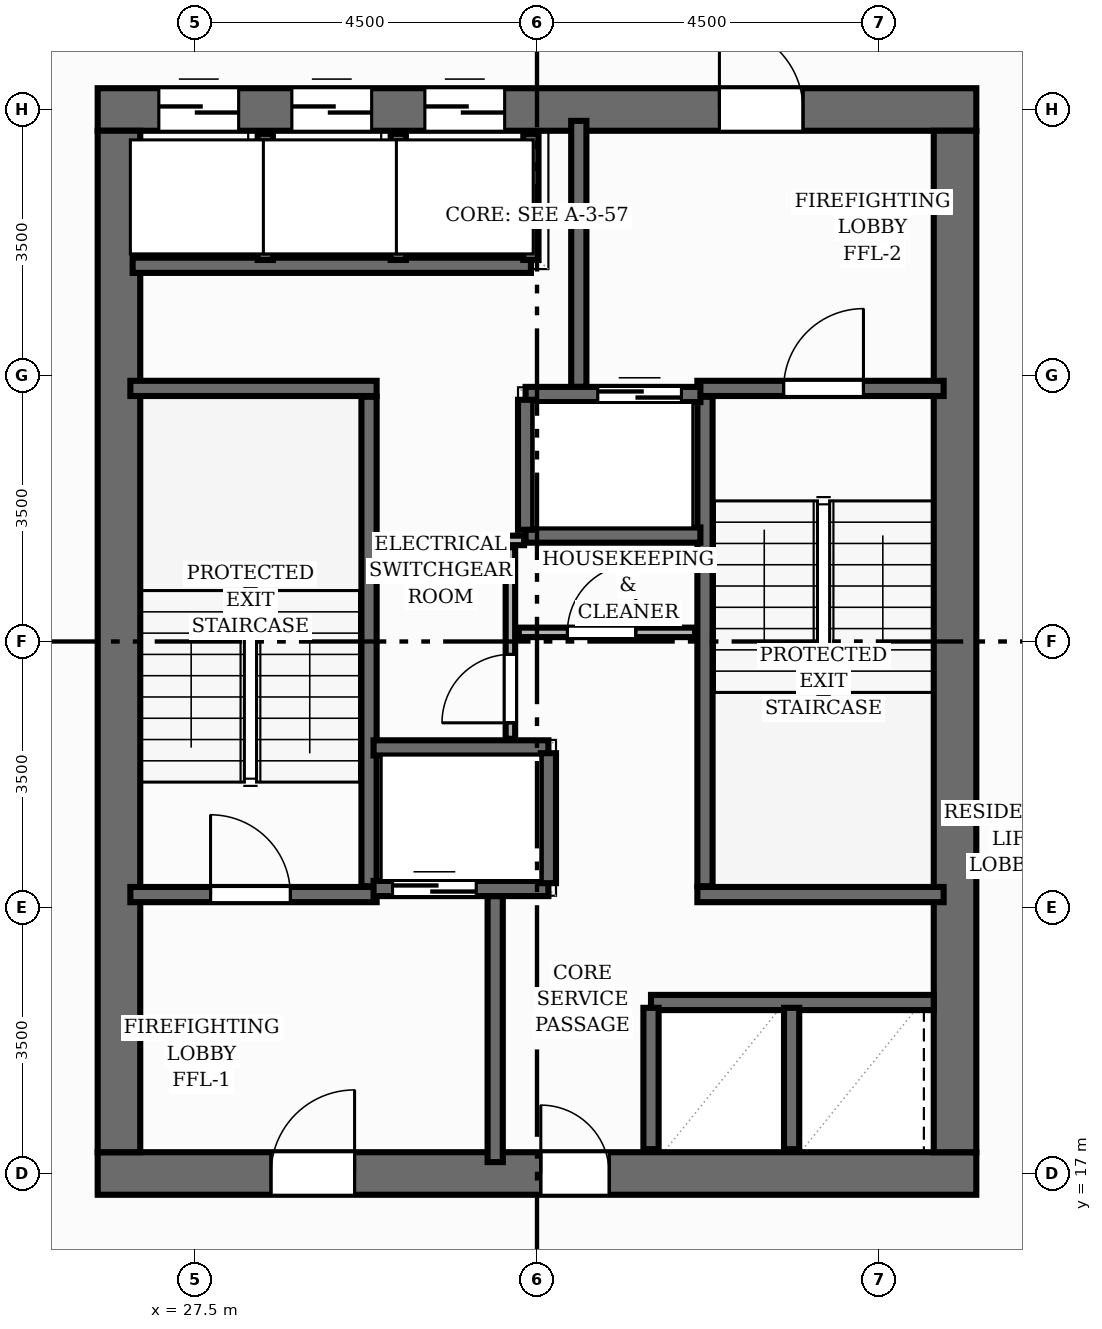
"""IFC4 building model, lengths in metres.
Left out: names, types, materials, properties, quantities, classifications, styles, units other than length and angle.
Written with IfcOpenShell. Run it as: python <this file> out.ifc"""

import sys

from ifc_helpers import new_model, si_unit, direction, frame, frame_2d, origin, place, context, subcontext, project, spatial, rectangle, extrude, element, fill, save


model = new_model("IFC4")
c1 = context("Model", 3, precision=1e-05, world=origin(), true_north=direction((0.0, 1.0)))
c2 = subcontext(c1, "Body", "Model", "MODEL_VIEW")
j1 = project(units=[si_unit("LENGTHUNIT", "METRE"), si_unit("PLANEANGLEUNIT", "RADIAN")], contexts=[c1])
p1 = place(None, origin())
s1 = spatial("IfcSite", under=j1, at=p1, CompositionType="ELEMENT")
p2 = place(p1, origin())
s2 = spatial("IfcBuilding", under=s1, at=p2, CompositionType="ELEMENT")
p3 = place(p2, frame((0.0, 0.0, 236.64)))
s3 = spatial("IfcBuildingStorey", under=s2, at=p3, CompositionType="ELEMENT", Elevation=236.64)
p4 = place(p3, frame((26.22, 17.0, 0.0), z_axis=(0.0, 0.0, 1.0), x_axis=(1.0, 0.0, 0.0)))
e1 = element("IfcWall", 1, at=p4, inside=s3, PredefinedType="SHEAR", context=c2, shape_type="SweptSolid", body=[
    extrude(rectangle(XDim=11.56, YDim=0.56, at=frame_2d((5.78, 0.0))), origin(), (0.0, 0.0, 1.0), 3.2),
])
p5 = place(p4, frame((2.28, 0.0, 0.0)))
e2 = element("IfcOpeningElement", 2, at=p5, cuts=e1, PredefinedType="OPENING", context=c2, shape_type="SweptSolid", body=[
    extrude(rectangle(XDim=1.1, YDim=2.15, at=frame_2d((0.55, 1.075))), frame((0.0, 0.29, 0.0), z_axis=(0.0, -1.0, 0.0), x_axis=(1.0, 0.0, 0.0)), (0.0, 0.0, 1.0), 0.58),
])
p6 = place(p4, frame((5.83, 0.0, 0.0)))
e3 = element("IfcOpeningElement", 3, at=p6, cuts=e1, PredefinedType="OPENING", context=c2, shape_type="SweptSolid", body=[
    extrude(rectangle(XDim=0.9, YDim=2.1, at=frame_2d((0.45, 1.05))), frame((0.0, 0.29, 0.0), z_axis=(0.0, -1.0, 0.0), x_axis=(1.0, 0.0, 0.0)), (0.0, 0.0, 1.0), 0.58),
])
p7 = place(p3, frame((26.22, 31.0, 0.0), z_axis=(0.0, 0.0, 1.0), x_axis=(1.0, 0.0, 0.0)))
e4 = element("IfcWall", 4, at=p7, inside=s3, PredefinedType="SHEAR", context=c2, shape_type="SweptSolid", body=[
    extrude(rectangle(XDim=11.56, YDim=0.56, at=frame_2d((5.78, 0.0))), origin(), (0.0, 0.0, 1.0), 3.2),
])
p8 = place(p7, frame((8.18, 0.0, 0.0)))
e5 = element("IfcOpeningElement", 5, at=p8, cuts=e4, PredefinedType="OPENING", context=c2, shape_type="SweptSolid", body=[
    extrude(rectangle(XDim=1.1, YDim=2.15, at=frame_2d((0.55, 1.075))), frame((0.0, 0.29, 0.0), z_axis=(0.0, -1.0, 0.0), x_axis=(1.0, 0.0, 0.0)), (0.0, 0.0, 1.0), 0.58),
])
p9 = place(p7, frame((0.805, 0.0, 0.0)))
e6 = element("IfcOpeningElement", 6, at=p9, cuts=e4, PredefinedType="OPENING", context=c2, shape_type="SweptSolid", body=[
    extrude(rectangle(XDim=1.05, YDim=2.15, at=frame_2d((0.525, 1.075))), frame((0.0, 0.29, 0.0), z_axis=(0.0, -1.0, 0.0), x_axis=(1.0, 0.0, 0.0)), (0.0, 0.0, 1.0), 0.58),
])
p10 = place(p7, frame((2.555, 0.0, 0.0)))
e7 = element("IfcOpeningElement", 7, at=p10, cuts=e4, PredefinedType="OPENING", context=c2, shape_type="SweptSolid", body=[
    extrude(rectangle(XDim=1.05, YDim=2.15, at=frame_2d((0.525, 1.075))), frame((0.0, 0.29, 0.0), z_axis=(0.0, -1.0, 0.0), x_axis=(1.0, 0.0, 0.0)), (0.0, 0.0, 1.0), 0.58),
])
p11 = place(p7, frame((4.305, 0.0, 0.0)))
e8 = element("IfcOpeningElement", 8, at=p11, cuts=e4, PredefinedType="OPENING", context=c2, shape_type="SweptSolid", body=[
    extrude(rectangle(XDim=1.05, YDim=2.15, at=frame_2d((0.525, 1.075))), frame((0.0, 0.29, 0.0), z_axis=(0.0, -1.0, 0.0), x_axis=(1.0, 0.0, 0.0)), (0.0, 0.0, 1.0), 0.58),
])
for number, where, z_axis, x_axis in (
    (9, (26.5, 17.28, 0.0), (0.0, 0.0, 1.0), (0.0, 1.0, 0.0)),
    (10, (37.5, 17.28, 0.0), (0.0, 0.0, 1.0), (0.0, 1.0, 0.0)),
):
    element("IfcWall", number, at=place(p3, frame(where, z_axis=z_axis, x_axis=x_axis)), inside=s3, PredefinedType="SHEAR", context=c2, shape_type="SweptSolid", body=[
        extrude(rectangle(XDim=13.44, YDim=0.56, at=frame_2d((6.72, 0.0))), origin(), (0.0, 0.0, 1.0), 3.2),
    ])
p12 = place(p3, frame((29.79, 20.78, 0.0), z_axis=(0.0, 0.0, 1.0), x_axis=(0.0, 1.0, 0.0)))
e11 = element("IfcWall", 11, at=p12, inside=s3, PredefinedType="SHEAR", context=c2, shape_type="SweptSolid", body=[
    extrude(rectangle(XDim=6.44, YDim=0.2, at=frame_2d((3.22, 0.0))), origin(), (0.0, 0.0, 1.0), 3.2),
])
p13 = place(p3, frame((26.65, 27.33, 0.0), z_axis=(0.0, 0.0, 1.0), x_axis=(1.0, 0.0, 0.0)))
e12 = element("IfcWall", 12, at=p13, inside=s3, PredefinedType="SHEAR", context=c2, shape_type="SweptSolid", body=[
    extrude(rectangle(XDim=3.24, YDim=0.2, at=frame_2d((1.62, 0.0))), origin(), (0.0, 0.0, 1.0), 3.2),
])
p14 = place(p3, frame((26.65, 20.67, 0.0), z_axis=(0.0, 0.0, 1.0), x_axis=(1.0, 0.0, 0.0)))
e13 = element("IfcWall", 13, at=p14, inside=s3, PredefinedType="SHEAR", context=c2, shape_type="SweptSolid", body=[
    extrude(rectangle(XDim=3.24, YDim=0.2, at=frame_2d((1.62, 0.0))), origin(), (0.0, 0.0, 1.0), 3.2),
])
p15 = place(p14, frame((1.055, 0.0, 0.0)))
e14 = element("IfcOpeningElement", 14, at=p15, cuts=e13, PredefinedType="OPENING", context=c2, shape_type="SweptSolid", body=[
    extrude(rectangle(XDim=1.05, YDim=2.15, at=frame_2d((0.525, 1.075))), frame((0.0, 0.11, 0.0), z_axis=(0.0, -1.0, 0.0), x_axis=(1.0, 0.0, 0.0)), (0.0, 0.0, 1.0), 0.22),
])
p16 = place(p3, frame((34.21, 20.78, 0.0), z_axis=(0.0, 0.0, 1.0), x_axis=(0.0, 1.0, 0.0)))
e15 = element("IfcWall", 15, at=p16, inside=s3, PredefinedType="SHEAR", context=c2, shape_type="SweptSolid", body=[
    extrude(rectangle(XDim=6.44, YDim=0.2, at=frame_2d((3.22, 0.0))), origin(), (0.0, 0.0, 1.0), 3.2),
])
p17 = place(p3, frame((34.11, 20.67, 0.0), z_axis=(0.0, 0.0, 1.0), x_axis=(1.0, 0.0, 0.0)))
e16 = element("IfcWall", 16, at=p17, inside=s3, PredefinedType="SHEAR", context=c2, shape_type="SweptSolid", body=[
    extrude(rectangle(XDim=3.24, YDim=0.2, at=frame_2d((1.62, 0.0))), origin(), (0.0, 0.0, 1.0), 3.2),
])
p18 = place(p3, frame((34.11, 27.33, 0.0), z_axis=(0.0, 0.0, 1.0), x_axis=(1.0, 0.0, 0.0)))
e17 = element("IfcWall", 17, at=p18, inside=s3, PredefinedType="SHEAR", context=c2, shape_type="SweptSolid", body=[
    extrude(rectangle(XDim=3.24, YDim=0.2, at=frame_2d((1.62, 0.0))), origin(), (0.0, 0.0, 1.0), 3.2),
])
p19 = place(p18, frame((1.135, 0.0, 0.0)))
e18 = element("IfcOpeningElement", 18, at=p19, cuts=e17, PredefinedType="OPENING", context=c2, shape_type="SweptSolid", body=[
    extrude(rectangle(XDim=1.05, YDim=2.15, at=frame_2d((0.525, 1.075))), frame((0.0, 0.11, 0.0), z_axis=(0.0, -1.0, 0.0), x_axis=(1.0, 0.0, 0.0)), (0.0, 0.0, 1.0), 0.22),
])
for number, where, z_axis, x_axis in (
    (19, (31.45, 17.15, 0.0), (0.0, 0.0, 1.0), (0.0, 1.0, 0.0)),
    (20, (32.55, 27.35, 0.0), (0.0, 0.0, 1.0), (0.0, 1.0, 0.0)),
):
    element("IfcWall", number, at=place(p3, frame(where, z_axis=z_axis, x_axis=x_axis)), inside=s3, PredefinedType="SHEAR", context=c2, shape_type="SweptSolid", body=[
        extrude(rectangle(XDim=3.5, YDim=0.2, at=frame_2d((1.75, 0.0))), origin(), (0.0, 0.0, 1.0), 3.2),
    ])
p20 = place(p3, frame((29.85, 20.75, 0.0), z_axis=(0.0, 0.0, 1.0), x_axis=(1.0, 0.0, 0.0)))
e21 = element("IfcWall", 21, at=p20, inside=s3, PredefinedType="SHEAR", context=c2, shape_type="SweptSolid", body=[
    extrude(rectangle(XDim=2.3, YDim=0.2, at=frame_2d((1.15, 0.0))), origin(), (0.0, 0.0, 1.0), 3.2),
])
p21 = place(p20, frame((0.25, 0.0, 0.0)))
e22 = element("IfcOpeningElement", 22, at=p21, cuts=e21, PredefinedType="OPENING", context=c2, shape_type="SweptSolid", body=[
    extrude(rectangle(XDim=1.1, YDim=2.15, at=frame_2d((0.55, 1.075))), frame((0.0, 0.11, 0.0), z_axis=(0.0, -1.0, 0.0), x_axis=(1.0, 0.0, 0.0)), (0.0, 0.0, 1.0), 0.22),
])
p22 = place(p3, frame((29.85, 22.6, 0.0), z_axis=(0.0, 0.0, 1.0), x_axis=(1.0, 0.0, 0.0)))
e23 = element("IfcWall", 23, at=p22, inside=s3, PredefinedType="SHEAR", context=c2, shape_type="SweptSolid", body=[
    extrude(rectangle(XDim=2.3, YDim=0.2, at=frame_2d((1.15, 0.0))), origin(), (0.0, 0.0, 1.0), 3.2),
])
p23 = place(p3, frame((32.15, 20.82, 0.0), z_axis=(0.0, 0.0, 1.0), x_axis=(0.0, 1.0, 0.0)))
e24 = element("IfcWall", 24, at=p23, inside=s3, PredefinedType="SHEAR", context=c2, shape_type="SweptSolid", body=[
    extrude(rectangle(XDim=1.71, YDim=0.2, at=frame_2d((0.855, 0.0))), origin(), (0.0, 0.0, 1.0), 3.2),
])
p24 = place(p3, frame((31.85, 27.25, 0.0), z_axis=(0.0, 0.0, 1.0), x_axis=(1.0, 0.0, 0.0)))
e25 = element("IfcWall", 25, at=p24, inside=s3, PredefinedType="SHEAR", context=c2, shape_type="SweptSolid", body=[
    extrude(rectangle(XDim=2.3, YDim=0.2, at=frame_2d((1.15, 0.0))), origin(), (0.0, 0.0, 1.0), 3.2),
])
p25 = place(p24, frame((0.95, 0.0, 0.0)))
e26 = element("IfcOpeningElement", 26, at=p25, cuts=e25, PredefinedType="OPENING", context=c2, shape_type="SweptSolid", body=[
    extrude(rectangle(XDim=1.1, YDim=2.15, at=frame_2d((0.55, 1.075))), frame((0.0, 0.11, 0.0), z_axis=(0.0, -1.0, 0.0), x_axis=(1.0, 0.0, 0.0)), (0.0, 0.0, 1.0), 0.22),
])
p26 = place(p3, frame((31.85, 25.4, 0.0), z_axis=(0.0, 0.0, 1.0), x_axis=(1.0, 0.0, 0.0)))
e27 = element("IfcWall", 27, at=p26, inside=s3, PredefinedType="SHEAR", context=c2, shape_type="SweptSolid", body=[
    extrude(rectangle(XDim=2.3, YDim=0.2, at=frame_2d((1.15, 0.0))), origin(), (0.0, 0.0, 1.0), 3.2),
])
p27 = place(p3, frame((31.85, 25.47, 0.0), z_axis=(0.0, 0.0, 1.0), x_axis=(0.0, 1.0, 0.0)))
e28 = element("IfcWall", 28, at=p27, inside=s3, PredefinedType="SHEAR", context=c2, shape_type="SweptSolid", body=[
    extrude(rectangle(XDim=1.71, YDim=0.2, at=frame_2d((0.855, 0.0))), origin(), (0.0, 0.0, 1.0), 3.2),
])
p28 = place(p3, frame((26.68, 28.95, 0.0), z_axis=(0.0, 0.0, 1.0), x_axis=(1.0, 0.0, 0.0)))
e29 = element("IfcWall", 29, at=p28, inside=s3, PredefinedType="SHEAR", context=c2, shape_type="SweptSolid", body=[
    extrude(rectangle(XDim=5.24, YDim=0.2, at=frame_2d((2.62, 0.0))), origin(), (0.0, 0.0, 1.0), 3.2),
])
for number, where, z_axis, x_axis in (
    (30, (31.92, 29.02, 0.0), (0.0, 0.0, 1.0), (0.0, 1.0, 0.0)),
    (31, (28.425, 29.02, 0.0), (0.0, 0.0, 1.0), (0.0, 1.0, 0.0)),
    (32, (30.175, 29.02, 0.0), (0.0, 0.0, 1.0), (0.0, 1.0, 0.0)),
):
    element("IfcWall", number, at=place(p3, frame(where, z_axis=z_axis, x_axis=x_axis)), inside=s3, PredefinedType="SHEAR", context=c2, shape_type="SweptSolid", body=[
        extrude(rectangle(XDim=1.66, YDim=0.2, at=frame_2d((0.83, 0.0))), origin(), (0.0, 0.0, 1.0), 3.2),
    ])
p29 = place(p3, frame((33.5, 19.25, 0.0), z_axis=(0.0, 0.0, 1.0), x_axis=(1.0, 0.0, 0.0)))
e33 = element("IfcWall", 33, at=p29, inside=s3, PredefinedType="SHEAR", context=c2, shape_type="SweptSolid", body=[
    extrude(rectangle(XDim=3.72, YDim=0.2, at=frame_2d((1.86, 0.0))), origin(), (0.0, 0.0, 1.0), 3.2),
])
for number, where, z_axis, x_axis in (
    (34, (33.5, 17.32, 0.0), (0.0, 0.0, 1.0), (0.0, 1.0, 0.0)),
    (35, (35.35, 17.32, 0.0), (0.0, 0.0, 1.0), (0.0, 1.0, 0.0)),
):
    element("IfcWall", number, at=place(p3, frame(where, z_axis=z_axis, x_axis=x_axis)), inside=s3, PredefinedType="SHEAR", context=c2, shape_type="SweptSolid", body=[
        extrude(rectangle(XDim=1.86, YDim=0.2, at=frame_2d((0.93, 0.0))), origin(), (0.0, 0.0, 1.0), 3.2),
    ])
p30 = place(p3, frame((31.65, 22.72, 0.0), z_axis=(0.0, 0.0, 1.0), x_axis=(0.0, 1.0, 0.0)))
e36 = element("IfcWall", 36, at=p30, inside=s3, PredefinedType="PARTITIONING", context=c2, shape_type="SweptSolid", body=[
    extrude(rectangle(XDim=2.52, YDim=0.125, at=frame_2d((1.26, 0.0))), origin(), (0.0, 0.0, 1.0), 2.955),
])
p31 = place(p30, frame((0.21, 0.0, 0.0)))
e37 = element("IfcOpeningElement", 37, at=p31, cuts=e36, PredefinedType="OPENING", context=c2, shape_type="SweptSolid", body=[
    extrude(rectangle(XDim=0.9, YDim=2.1, at=frame_2d((0.45, 1.05))), frame((0.0, 0.073, 0.0), z_axis=(0.0, -1.0, 0.0), x_axis=(1.0, 0.0, 0.0)), (0.0, 0.0, 1.0), 0.145),
])
p32 = place(p3, frame((31.76, 24.12, 0.0), z_axis=(0.0, 0.0, 1.0), x_axis=(1.0, 0.0, 0.0)))
e38 = element("IfcWall", 38, at=p32, inside=s3, PredefinedType="PARTITIONING", context=c2, shape_type="SweptSolid", body=[
    extrude(rectangle(XDim=2.32, YDim=0.125, at=frame_2d((1.16, 0.0))), origin(), (0.0, 0.0, 1.0), 2.955),
])
p33 = place(p32, frame((0.64, 0.0, 0.0)))
e39 = element("IfcOpeningElement", 39, at=p33, cuts=e38, PredefinedType="OPENING", context=c2, shape_type="SweptSolid", body=[
    extrude(rectangle(XDim=0.9, YDim=2.1, at=frame_2d((0.45, 1.05))), frame((0.0, 0.073, 0.0), z_axis=(0.0, -1.0, 0.0), x_axis=(1.0, 0.0, 0.0)), (0.0, 0.0, 1.0), 0.145),
])
p34 = place(p3, frame((29.89, 25.33, 0.0), z_axis=(0.0, 0.0, 1.0), x_axis=(1.0, 0.0, 0.0)))
e40 = element("IfcWall", 40, at=p34, inside=s3, PredefinedType="PARTITIONING", context=c2, shape_type="SweptSolid", body=[
    extrude(rectangle(XDim=1.94, YDim=0.125, at=frame_2d((0.97, 0.0))), origin(), (0.0, 0.0, 1.0), 2.955),
])
p35 = place(p15, origin())
e41 = element("IfcDoor", 41, at=p35, inside=s3, OperationType="SINGLE_SWING_LEFT", PredefinedType="DOOR", context=c2, shape_type="SweptSolid", body=[
    extrude(rectangle(XDim=1.05, YDim=2.15, at=frame_2d((0.525, 1.075))), frame((0.0, 0.025, 0.0), z_axis=(0.0, -1.0, 0.0), x_axis=(1.0, 0.0, 0.0)), (0.0, 0.0, 1.0), 0.05),
])
fill(e14, e41)
p36 = place(p19, origin())
e42 = element("IfcDoor", 42, at=p36, inside=s3, OperationType="SINGLE_SWING_RIGHT", PredefinedType="DOOR", context=c2, shape_type="SweptSolid", body=[
    extrude(rectangle(XDim=1.05, YDim=2.15, at=frame_2d((0.525, 1.075))), frame((0.0, 0.025, 0.0), z_axis=(0.0, -1.0, 0.0), x_axis=(1.0, 0.0, 0.0)), (0.0, 0.0, 1.0), 0.05),
])
fill(e18, e42)
p37 = place(p5, origin())
e43 = element("IfcDoor", 43, at=p37, inside=s3, OperationType="SINGLE_SWING_RIGHT", PredefinedType="DOOR", context=c2, shape_type="SweptSolid", body=[
    extrude(rectangle(XDim=1.1, YDim=2.15, at=frame_2d((0.55, 1.075))), frame((0.0, 0.025, 0.0), z_axis=(0.0, -1.0, 0.0), x_axis=(1.0, 0.0, 0.0)), (0.0, 0.0, 1.0), 0.05),
])
fill(e2, e43)
p38 = place(p8, origin())
e44 = element("IfcDoor", 44, at=p38, inside=s3, OperationType="SINGLE_SWING_LEFT", PredefinedType="DOOR", context=c2, shape_type="SweptSolid", body=[
    extrude(rectangle(XDim=1.1, YDim=2.15, at=frame_2d((0.55, 1.075))), frame((0.0, 0.025, 0.0), z_axis=(0.0, -1.0, 0.0), x_axis=(1.0, 0.0, 0.0)), (0.0, 0.0, 1.0), 0.05),
])
fill(e5, e44)
p39 = place(p21, origin())
e45 = element("IfcDoor", 45, at=p39, inside=s3, OperationType="DOUBLE_DOOR_SLIDING", PredefinedType="DOOR", context=c2, shape_type="SweptSolid", body=[
    extrude(rectangle(XDim=1.1, YDim=2.15, at=frame_2d((0.55, 1.075))), frame((0.0, 0.025, 0.0), z_axis=(0.0, -1.0, 0.0), x_axis=(1.0, 0.0, 0.0)), (0.0, 0.0, 1.0), 0.05),
])
fill(e22, e45)
p40 = place(p25, origin())
e46 = element("IfcDoor", 46, at=p40, inside=s3, OperationType="DOUBLE_DOOR_SLIDING", PredefinedType="DOOR", context=c2, shape_type="SweptSolid", body=[
    extrude(rectangle(XDim=1.1, YDim=2.15, at=frame_2d((0.55, 1.075))), frame((0.0, 0.025, 0.0), z_axis=(0.0, -1.0, 0.0), x_axis=(1.0, 0.0, 0.0)), (0.0, 0.0, 1.0), 0.05),
])
fill(e26, e46)
p41 = place(p9, origin())
e47 = element("IfcDoor", 47, at=p41, inside=s3, OperationType="DOUBLE_DOOR_SLIDING", PredefinedType="DOOR", context=c2, shape_type="SweptSolid", body=[
    extrude(rectangle(XDim=1.05, YDim=2.15, at=frame_2d((0.525, 1.075))), frame((0.0, 0.025, 0.0), z_axis=(0.0, -1.0, 0.0), x_axis=(1.0, 0.0, 0.0)), (0.0, 0.0, 1.0), 0.05),
])
fill(e6, e47)
p42 = place(p10, origin())
e48 = element("IfcDoor", 48, at=p42, inside=s3, OperationType="DOUBLE_DOOR_SLIDING", PredefinedType="DOOR", context=c2, shape_type="SweptSolid", body=[
    extrude(rectangle(XDim=1.05, YDim=2.15, at=frame_2d((0.525, 1.075))), frame((0.0, 0.025, 0.0), z_axis=(0.0, -1.0, 0.0), x_axis=(1.0, 0.0, 0.0)), (0.0, 0.0, 1.0), 0.05),
])
fill(e7, e48)
p43 = place(p11, origin())
e49 = element("IfcDoor", 49, at=p43, inside=s3, OperationType="DOUBLE_DOOR_SLIDING", PredefinedType="DOOR", context=c2, shape_type="SweptSolid", body=[
    extrude(rectangle(XDim=1.05, YDim=2.15, at=frame_2d((0.525, 1.075))), frame((0.0, 0.025, 0.0), z_axis=(0.0, -1.0, 0.0), x_axis=(1.0, 0.0, 0.0)), (0.0, 0.0, 1.0), 0.05),
])
fill(e8, e49)
p44 = place(p6, origin())
e50 = element("IfcDoor", 50, at=p44, inside=s3, OperationType="SINGLE_SWING_LEFT", PredefinedType="DOOR", context=c2, shape_type="SweptSolid", body=[
    extrude(rectangle(XDim=0.9, YDim=2.1, at=frame_2d((0.45, 1.05))), frame((0.0, 0.025, 0.0), z_axis=(0.0, -1.0, 0.0), x_axis=(1.0, 0.0, 0.0)), (0.0, 0.0, 1.0), 0.05),
])
fill(e3, e50)
p45 = place(p31, origin())
e51 = element("IfcDoor", 51, at=p45, inside=s3, OperationType="SINGLE_SWING_LEFT", PredefinedType="DOOR", context=c2, shape_type="SweptSolid", body=[
    extrude(rectangle(XDim=0.9, YDim=2.1, at=frame_2d((0.45, 1.05))), frame((0.0, 0.025, 0.0), z_axis=(0.0, -1.0, 0.0), x_axis=(1.0, 0.0, 0.0)), (0.0, 0.0, 1.0), 0.05),
])
fill(e37, e51)
p46 = place(p33, origin())
e52 = element("IfcDoor", 52, at=p46, inside=s3, OperationType="SINGLE_SWING_RIGHT", PredefinedType="DOOR", context=c2, shape_type="SweptSolid", body=[
    extrude(rectangle(XDim=0.9, YDim=2.1, at=frame_2d((0.45, 1.05))), frame((0.0, 0.025, 0.0), z_axis=(0.0, -1.0, 0.0), x_axis=(1.0, 0.0, 0.0)), (0.0, 0.0, 1.0), 0.05),
])
fill(e39, e52)
save(model, sys.argv[1])
